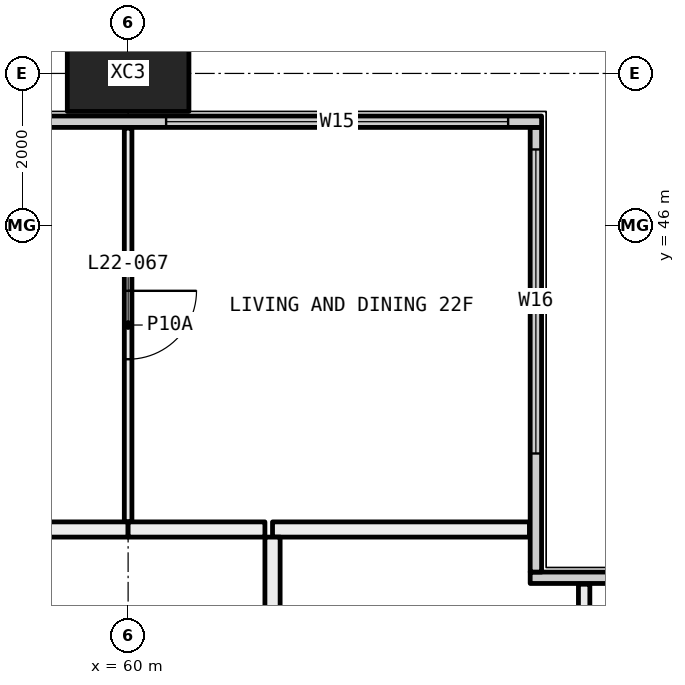
"""IFC4 building model, lengths in metres.
Left out: names, types, materials, properties, quantities, classifications, styles, units other than length and angle.
Written with IfcOpenShell. Run it as: python <this file> out.ifc"""

import sys

from ifc_helpers import new_model, si_unit, direction, frame, frame_2d, origin, origin_2d, place, context, subcontext, project, spatial, rectangle, hollow_rectangle, extrude, element, fill, save


model = new_model("IFC4")
c1 = context("Model", 3, precision=1e-05, world=origin(), true_north=direction((0.0, 1.0)))
c2 = subcontext(c1, "Body", "Model", "MODEL_VIEW")
j1 = project(units=[si_unit("LENGTHUNIT", "METRE"), si_unit("PLANEANGLEUNIT", "RADIAN")], contexts=[c1])
p1 = place(None, origin())
s1 = spatial("IfcSite", under=j1, at=p1, CompositionType="ELEMENT")
p2 = place(p1, origin())
s2 = spatial("IfcBuilding", under=s1, at=p2, CompositionType="ELEMENT")
p3 = place(p2, frame((0.0, 0.0, 88.65)))
s3 = spatial("IfcBuildingStorey", under=s2, at=p3, CompositionType="ELEMENT", Elevation=88.65)
p4 = place(p3, frame((60.0, 48.0, -0.4), z_axis=(0.0, 0.0, 1.0), x_axis=(1.0, 0.0, 0.0)))
e1 = element("IfcColumn", 1, at=p4, inside=s3, PredefinedType="COLUMN", context=c2, shape_type="SweptSolid", body=[
    extrude(hollow_rectangle(XDim=1.6, YDim=1.0, WallThickness=0.065, at=origin_2d()), origin(), (0.0, 0.0, 1.0), 3.45),
])
p5 = place(p3, frame((65.29, 41.365, 0.0), z_axis=(0.0, 0.0, 1.0), x_axis=(1.0, 0.0, 0.0)))
e2 = element("IfcWall", 2, at=p5, inside=s3, PredefinedType="ELEMENTEDWALL", context=c2, shape_type="SweptSolid", body=[
    extrude(rectangle(XDim=6.15, YDim=0.15, at=frame_2d((3.075, 0.0))), origin(), (0.0, 0.0, 1.0), 3.05),
])
p6 = place(p5, frame((1.71, 0.0, 0.45)))
e3 = element("IfcOpeningElement", 3, at=p6, cuts=e2, PredefinedType="OPENING", context=c2, shape_type="SweptSolid", body=[
    extrude(rectangle(XDim=4.0, YDim=2.55, at=frame_2d((2.0, 1.275))), frame((0.0, 0.085, 0.0), z_axis=(0.0, -1.0, 0.0), x_axis=(1.0, 0.0, 0.0)), (0.0, 0.0, 1.0), 0.17),
])
p7 = place(p3, frame((65.365, 41.44, 0.0), z_axis=(0.0, 0.0, 1.0), x_axis=(0.0, 1.0, 0.0)))
e4 = element("IfcWall", 4, at=p7, inside=s3, PredefinedType="ELEMENTEDWALL", context=c2, shape_type="SweptSolid", body=[
    extrude(rectangle(XDim=5.85, YDim=0.15, at=frame_2d((2.925, 0.0))), origin(), (0.0, 0.0, 1.0), 3.05),
])
p8 = place(p7, frame((1.56, 0.0, 0.45)))
e5 = element("IfcOpeningElement", 5, at=p8, cuts=e4, PredefinedType="OPENING", context=c2, shape_type="SweptSolid", body=[
    extrude(rectangle(XDim=4.0, YDim=2.55, at=frame_2d((2.0, 1.275))), frame((0.0, 0.085, 0.0), z_axis=(0.0, -1.0, 0.0), x_axis=(1.0, 0.0, 0.0)), (0.0, 0.0, 1.0), 0.17),
])
p9 = place(p3, frame((6.56, 47.365, 0.0), z_axis=(0.0, 0.0, 1.0), x_axis=(1.0, 0.0, 0.0)))
e6 = element("IfcWall", 6, at=p9, inside=s3, PredefinedType="ELEMENTEDWALL", context=c2, shape_type="SweptSolid", body=[
    extrude(rectangle(XDim=58.88, YDim=0.15, at=frame_2d((29.44, 0.0))), origin(), (0.0, 0.0, 1.0), 3.05),
])
p10 = place(p9, frame((0.44, 0.0, 0.45)))
e7 = element("IfcOpeningElement", 7, at=p10, cuts=e6, PredefinedType="OPENING", context=c2, shape_type="SweptSolid", body=[
    extrude(rectangle(XDim=4.5, YDim=2.55, at=frame_2d((2.25, 1.275))), frame((0.0, 0.085, 0.0), z_axis=(0.0, -1.0, 0.0), x_axis=(1.0, 0.0, 0.0)), (0.0, 0.0, 1.0), 0.17),
])
p11 = place(p9, frame((7.69, 0.0, 0.45)))
e8 = element("IfcOpeningElement", 8, at=p11, cuts=e6, PredefinedType="OPENING", context=c2, shape_type="SweptSolid", body=[
    extrude(rectangle(XDim=3.25, YDim=2.55, at=frame_2d((1.625, 1.275))), frame((0.0, 0.085, 0.0), z_axis=(0.0, -1.0, 0.0), x_axis=(1.0, 0.0, 0.0)), (0.0, 0.0, 1.0), 0.17),
])
p12 = place(p9, frame((11.94, 0.0, 0.45)))
e9 = element("IfcOpeningElement", 9, at=p12, cuts=e6, PredefinedType="OPENING", context=c2, shape_type="SweptSolid", body=[
    extrude(rectangle(XDim=3.25, YDim=2.55, at=frame_2d((1.625, 1.275))), frame((0.0, 0.085, 0.0), z_axis=(0.0, -1.0, 0.0), x_axis=(1.0, 0.0, 0.0)), (0.0, 0.0, 1.0), 0.17),
])
p13 = place(p9, frame((19.69, 0.0, 0.45)))
e10 = element("IfcOpeningElement", 10, at=p13, cuts=e6, PredefinedType="OPENING", context=c2, shape_type="SweptSolid", body=[
    extrude(rectangle(XDim=3.25, YDim=2.55, at=frame_2d((1.625, 1.275))), frame((0.0, 0.085, 0.0), z_axis=(0.0, -1.0, 0.0), x_axis=(1.0, 0.0, 0.0)), (0.0, 0.0, 1.0), 0.17),
])
p14 = place(p9, frame((23.94, 0.0, 0.45)))
e11 = element("IfcOpeningElement", 11, at=p14, cuts=e6, PredefinedType="OPENING", context=c2, shape_type="SweptSolid", body=[
    extrude(rectangle(XDim=2.0, YDim=2.55, at=frame_2d((1.0, 1.275))), frame((0.0, 0.085, 0.0), z_axis=(0.0, -1.0, 0.0), x_axis=(1.0, 0.0, 0.0)), (0.0, 0.0, 1.0), 0.17),
])
p15 = place(p9, frame((31.69, 0.0, 0.45)))
e12 = element("IfcOpeningElement", 12, at=p15, cuts=e6, PredefinedType="OPENING", context=c2, shape_type="SweptSolid", body=[
    extrude(rectangle(XDim=3.25, YDim=2.55, at=frame_2d((1.625, 1.275))), frame((0.0, 0.085, 0.0), z_axis=(0.0, -1.0, 0.0), x_axis=(1.0, 0.0, 0.0)), (0.0, 0.0, 1.0), 0.17),
])
p16 = place(p9, frame((35.94, 0.0, 0.45)))
e13 = element("IfcOpeningElement", 13, at=p16, cuts=e6, PredefinedType="OPENING", context=c2, shape_type="SweptSolid", body=[
    extrude(rectangle(XDim=3.25, YDim=2.55, at=frame_2d((1.625, 1.275))), frame((0.0, 0.085, 0.0), z_axis=(0.0, -1.0, 0.0), x_axis=(1.0, 0.0, 0.0)), (0.0, 0.0, 1.0), 0.17),
])
p17 = place(p9, frame((43.69, 0.0, 0.45)))
e14 = element("IfcOpeningElement", 14, at=p17, cuts=e6, PredefinedType="OPENING", context=c2, shape_type="SweptSolid", body=[
    extrude(rectangle(XDim=3.25, YDim=2.55, at=frame_2d((1.625, 1.275))), frame((0.0, 0.085, 0.0), z_axis=(0.0, -1.0, 0.0), x_axis=(1.0, 0.0, 0.0)), (0.0, 0.0, 1.0), 0.17),
])
p18 = place(p9, frame((47.94, 0.0, 0.45)))
e15 = element("IfcOpeningElement", 15, at=p18, cuts=e6, PredefinedType="OPENING", context=c2, shape_type="SweptSolid", body=[
    extrude(rectangle(XDim=2.0, YDim=2.55, at=frame_2d((1.0, 1.275))), frame((0.0, 0.085, 0.0), z_axis=(0.0, -1.0, 0.0), x_axis=(1.0, 0.0, 0.0)), (0.0, 0.0, 1.0), 0.17),
])
p19 = place(p9, frame((53.94, 0.0, 0.45)))
e16 = element("IfcOpeningElement", 16, at=p19, cuts=e6, PredefinedType="OPENING", context=c2, shape_type="SweptSolid", body=[
    extrude(rectangle(XDim=4.5, YDim=2.55, at=frame_2d((2.25, 1.275))), frame((0.0, 0.085, 0.0), z_axis=(0.0, -1.0, 0.0), x_axis=(1.0, 0.0, 0.0)), (0.0, 0.0, 1.0), 0.17),
])
p20 = place(p3, frame((66.0, 41.28, 0.0), z_axis=(0.0, 0.0, 1.0), x_axis=(0.0, -1.0, 0.0)))
e17 = element("IfcWall", 17, at=p20, inside=s3, PredefinedType="PARTITIONING", context=c2, shape_type="SweptSolid", body=[
    extrude(rectangle(XDim=2.28, YDim=0.15, at=frame_2d((1.14, 0.0))), origin(), (0.0, 0.0, 1.0), 3.05),
])
p21 = place(p3, frame((65.28, 42.0, 0.0), z_axis=(0.0, 0.0, 1.0), x_axis=(-1.0, 0.0, 0.0)))
e18 = element("IfcWall", 18, at=p21, inside=s3, PredefinedType="PARTITIONING", context=c2, shape_type="SweptSolid", body=[
    extrude(rectangle(XDim=3.38, YDim=0.2, at=frame_2d((1.69, 0.0))), origin(), (0.0, 0.0, 1.0), 3.05),
])
p22 = place(p3, frame((61.9, 41.9, 0.0), z_axis=(0.0, 0.0, 1.0), x_axis=(0.0, -1.0, 0.0)))
e19 = element("IfcWall", 19, at=p22, inside=s3, PredefinedType="PARTITIONING", context=c2, shape_type="SweptSolid", body=[
    extrude(rectangle(XDim=2.9, YDim=0.2, at=frame_2d((1.45, 0.0))), origin(), (0.0, 0.0, 1.0), 3.05),
])
p23 = place(p3, frame((60.0, 42.1, 0.0), z_axis=(0.0, 0.0, 1.0), x_axis=(0.0, 1.0, 0.0)))
e20 = element("IfcWall", 20, at=p23, inside=s3, PredefinedType="PARTITIONING", context=c2, shape_type="SweptSolid", body=[
    extrude(rectangle(XDim=5.18, YDim=0.1, at=frame_2d((2.59, 0.0))), origin(), (0.0, 0.0, 1.0), 3.05),
])
p24 = place(p23, frame((2.14, 0.0, 0.0)))
e21 = element("IfcOpeningElement", 21, at=p24, cuts=e20, PredefinedType="OPENING", context=c2, shape_type="SweptSolid", body=[
    extrude(rectangle(XDim=0.9, YDim=2.1, at=frame_2d((0.45, 1.05))), frame((0.0, 0.06, 0.0), z_axis=(0.0, -1.0, 0.0), x_axis=(1.0, 0.0, 0.0)), (0.0, 0.0, 1.0), 0.12),
])
p25 = place(p3, frame((54.0, 42.0, 0.0), z_axis=(0.0, 0.0, 1.0), x_axis=(1.0, 0.0, 0.0)))
e22 = element("IfcWall", 22, at=p25, inside=s3, PredefinedType="PARTITIONING", context=c2, shape_type="SweptSolid", body=[
    extrude(rectangle(XDim=6.0, YDim=0.2, at=frame_2d((3.0, 0.0))), origin(), (0.0, 0.0, 1.0), 3.05),
])
p26 = place(p25, frame((2.5, 0.0, 0.0)))
e23 = element("IfcOpeningElement", 23, at=p26, cuts=e22, PredefinedType="OPENING", context=c2, shape_type="SweptSolid", body=[
    extrude(rectangle(XDim=1.0, YDim=2.1, at=frame_2d((0.5, 1.05))), frame((0.0, 0.11, 0.0), z_axis=(0.0, -1.0, 0.0), x_axis=(1.0, 0.0, 0.0)), (0.0, 0.0, 1.0), 0.22),
])
p27 = place(p3, frame((60.0, 42.0, 0.0), z_axis=(0.0, 0.0, 1.0), x_axis=(1.0, 0.0, 0.0)))
e24 = element("IfcWall", 24, at=p27, inside=s3, PredefinedType="PARTITIONING", context=c2, shape_type="SweptSolid", body=[
    extrude(rectangle(XDim=1.8, YDim=0.2, at=frame_2d((0.9, 0.0))), origin(), (0.0, 0.0, 1.0), 3.05),
])
p28 = place(p8, origin())
e25 = element("IfcWindow", 25, at=p28, inside=s3, PartitioningType="SINGLE_PANEL", PredefinedType="WINDOW", context=c2, shape_type="SweptSolid", body=[
    extrude(rectangle(XDim=4.0, YDim=2.55, at=frame_2d((2.0, 1.275))), frame((0.0, 0.03, 0.0), z_axis=(0.0, -1.0, 0.0), x_axis=(1.0, 0.0, 0.0)), (0.0, 0.0, 1.0), 0.06),
])
fill(e5, e25)
p29 = place(p19, origin())
e26 = element("IfcWindow", 26, at=p29, inside=s3, PartitioningType="SINGLE_PANEL", PredefinedType="WINDOW", context=c2, shape_type="SweptSolid", body=[
    extrude(rectangle(XDim=4.5, YDim=2.55, at=frame_2d((2.25, 1.275))), frame((0.0, 0.03, 0.0), z_axis=(0.0, -1.0, 0.0), x_axis=(1.0, 0.0, 0.0)), (0.0, 0.0, 1.0), 0.06),
])
fill(e16, e26)
p30 = place(p24, frame((0.9, 0.0, 0.0), x_axis=(-1.0, 0.0, 0.0)))
e27 = element("IfcDoor", 27, at=p30, inside=s3, OperationType="SINGLE_SWING_RIGHT", PredefinedType="DOOR", context=c2, shape_type="SweptSolid", body=[
    extrude(rectangle(XDim=0.9, YDim=2.1, at=frame_2d((0.45, 1.05))), frame((0.0, 0.025, 0.0), z_axis=(0.0, -1.0, 0.0), x_axis=(1.0, 0.0, 0.0)), (0.0, 0.0, 1.0), 0.05),
])
fill(e21, e27)
save(model, sys.argv[1])
